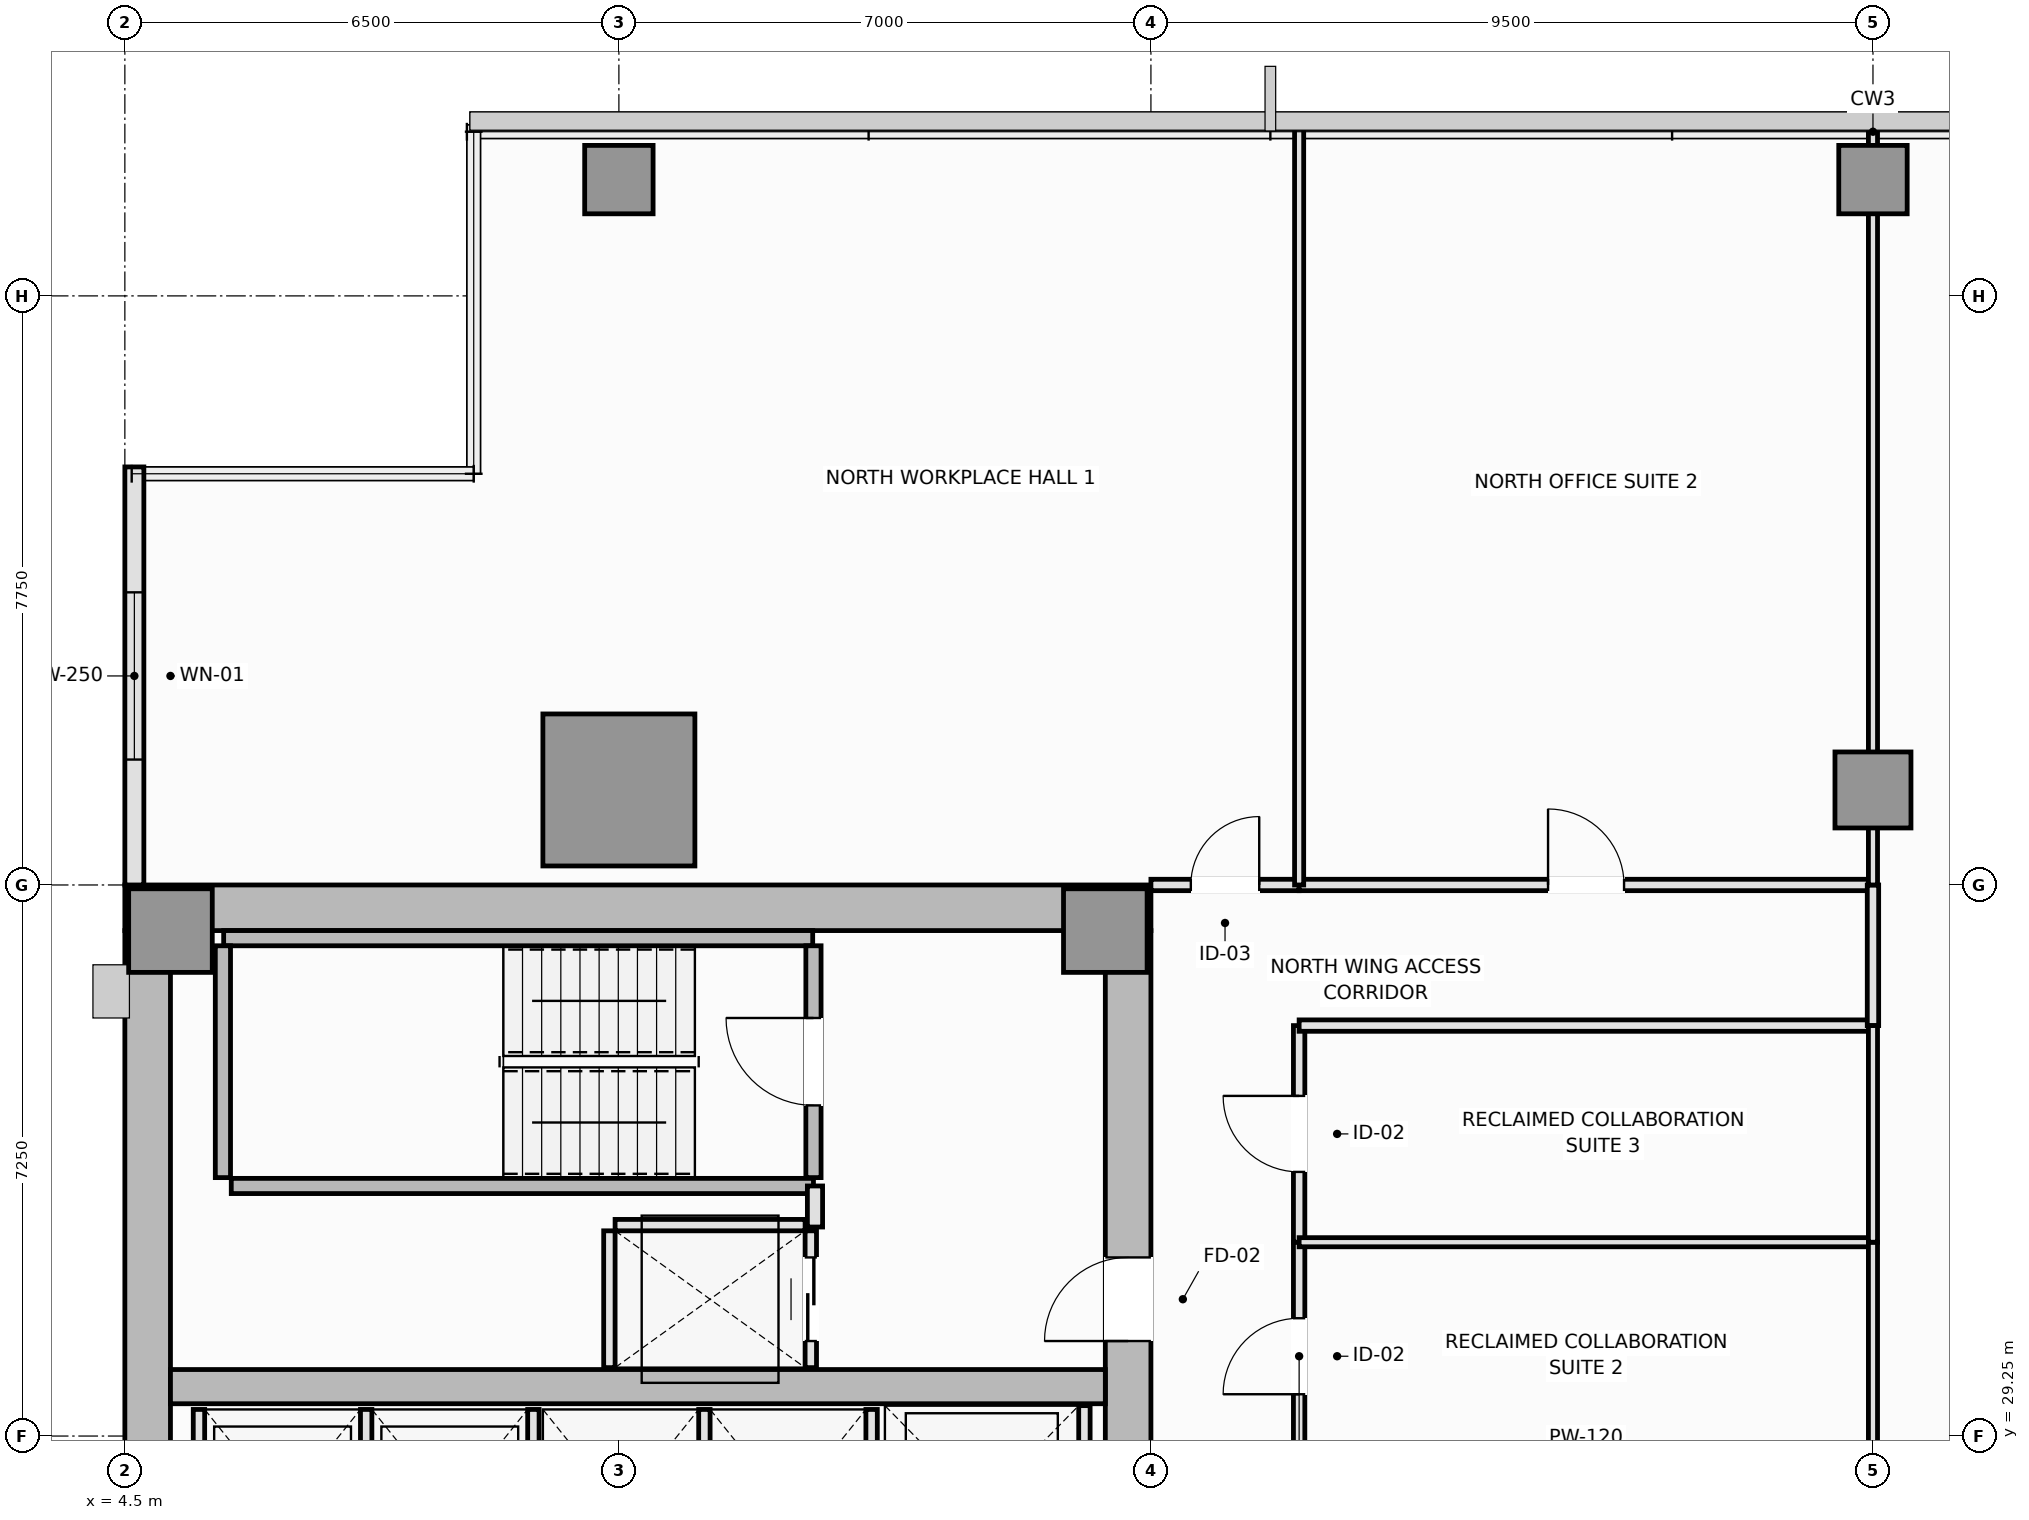
"""IFC4 building model, lengths in metres.
Left out: names, types, materials, properties, quantities, classifications, styles, units other than length and angle.
Written with IfcOpenShell. Run it as: python <this file> out.ifc"""

import sys

from ifc_helpers import new_model, si_unit, direction, frame, frame_2d, origin, origin_2d, place, context, subcontext, project, spatial, rectangle, extrude, element, fill, save


model = new_model("IFC4")
c1 = context("Model", 3, precision=1e-05, world=origin(), true_north=direction((0.0, 1.0)))
c2 = subcontext(c1, "Body", "Model", "MODEL_VIEW")
j1 = project(units=[si_unit("LENGTHUNIT", "METRE"), si_unit("PLANEANGLEUNIT", "RADIAN")], contexts=[c1])
p1 = place(None, origin())
s1 = spatial("IfcSite", under=j1, at=p1, CompositionType="ELEMENT")
p2 = place(p1, origin())
s2 = spatial("IfcBuilding", under=s1, at=p2, CompositionType="ELEMENT")
p3 = place(p2, frame((0.0, 0.0, 169.7)))
s3 = spatial("IfcBuildingStorey", under=s2, at=p3, CompositionType="ELEMENT", Elevation=169.7)
p4 = place(p3, frame((4.5, 36.2, 0.0), z_axis=(0.0, 0.0, 1.0), x_axis=(1.0, 0.0, 0.0)))
e1 = element("IfcWall", 1, at=p4, inside=s3, PredefinedType="SHEAR", context=c2, shape_type="SweptSolid", body=[
    extrude(rectangle(XDim=13.5, YDim=0.6, at=frame_2d((6.75, 0.0))), origin(), (0.0, 0.0, 1.0), 3.55),
])
p5 = place(p3, frame((4.8, 14.6, 0.0), z_axis=(0.0, 0.0, 1.0), x_axis=(0.0, 1.0, 0.0)))
e2 = element("IfcWall", 2, at=p5, inside=s3, PredefinedType="SHEAR", context=c2, shape_type="SweptSolid", body=[
    extrude(rectangle(XDim=21.3, YDim=0.6, at=frame_2d((10.65, 0.0))), origin(), (0.0, 0.0, 1.0), 3.55),
])
p6 = place(p3, frame((17.7, 27.05, 0.0), z_axis=(0.0, 0.0, 1.0), x_axis=(0.0, 1.0, 0.0)))
e3 = element("IfcWall", 3, at=p6, inside=s3, PredefinedType="SHEAR", context=c2, shape_type="SweptSolid", body=[
    extrude(rectangle(XDim=8.85, YDim=0.6, at=frame_2d((4.425, 0.0))), origin(), (0.0, 0.0, 1.0), 3.55),
])
p7 = place(p6, frame((3.45, 0.0, 0.0)))
e4 = element("IfcOpeningElement", 4, at=p7, cuts=e3, PredefinedType="OPENING", context=c2, shape_type="SweptSolid", body=[
    extrude(rectangle(XDim=1.1, YDim=2.15, at=frame_2d((0.55, 1.075))), frame((0.0, 0.31, 0.0), z_axis=(0.0, -1.0, 0.0), x_axis=(1.0, 0.0, 0.0)), (0.0, 0.0, 1.0), 0.62),
])
p8 = place(p3, frame((5.1, 29.9, 0.0), z_axis=(0.0, 0.0, 1.0), x_axis=(1.0, 0.0, 0.0)))
e5 = element("IfcWall", 5, at=p8, inside=s3, PredefinedType="SHEAR", context=c2, shape_type="SweptSolid", body=[
    extrude(rectangle(XDim=12.3, YDim=0.45, at=frame_2d((6.15, 0.0))), origin(), (0.0, 0.0, 1.0), 3.55),
])
for number, where, z_axis, x_axis in (
    (6, (5.1, 35.9, 0.0), (0.0, 0.0, 1.0), (1.0, 0.0, 0.0)),
    (7, (17.4, 35.9, 0.0), (0.0, 0.0, 1.0), (1.0, 0.0, 0.0)),
):
    element("IfcColumn", number, at=place(p3, frame(where, z_axis=z_axis, x_axis=x_axis)), inside=s3, PredefinedType="PILASTER", context=c2, shape_type="SweptSolid", body=[
        extrude(rectangle(XDim=1.1, YDim=1.1, at=origin_2d()), origin(), (0.0, 0.0, 1.0), 3.55),
    ])
p9 = place(p3, frame((11.0, 37.75, 0.0), z_axis=(0.0, 0.0, 1.0), x_axis=(1.0, 0.0, 0.0)))
e8 = element("IfcColumn", 8, at=p9, inside=s3, PredefinedType="COLUMN", context=c2, shape_type="SweptSolid", body=[
    extrude(rectangle(XDim=2.0, YDim=2.0, at=origin_2d()), origin(), (0.0, 0.0, 1.0), 3.55),
])
p10 = place(p3, frame((27.5, 37.75, 0.0), z_axis=(0.0, 0.0, 1.0), x_axis=(1.0, 0.0, 0.0)))
e9 = element("IfcColumn", 9, at=p10, inside=s3, PredefinedType="COLUMN", context=c2, shape_type="SweptSolid", body=[
    extrude(rectangle(XDim=1.0, YDim=1.0, at=origin_2d()), origin(), (0.0, 0.0, 1.0), 3.55),
])
for number, where, z_axis, x_axis in (
    (10, (11.0, 45.78, 0.0), (0.0, 0.0, 1.0), (1.0, 0.0, 0.0)),
    (11, (27.5, 45.78, 0.0), (0.0, 0.0, 1.0), (1.0, 0.0, 0.0)),
):
    element("IfcColumn", number, at=place(p3, frame(where, z_axis=z_axis, x_axis=x_axis)), inside=s3, PredefinedType="COLUMN", context=c2, shape_type="SweptSolid", body=[
        extrude(rectangle(XDim=0.9, YDim=0.9, at=origin_2d()), origin(), (0.0, 0.0, 1.0), 3.55),
    ])
p11 = place(p3, frame((4.625, 42.0, 0.0), z_axis=(0.0, 0.0, 1.0), x_axis=(0.0, -1.0, 0.0)))
e12 = element("IfcWall", 12, at=p11, inside=s3, PredefinedType="SOLIDWALL", context=c2, shape_type="SweptSolid", body=[
    extrude(rectangle(XDim=5.5, YDim=0.25, at=frame_2d((2.75, 0.0))), origin(), (0.0, 0.0, 1.0), 3.35),
])
p12 = place(p11, frame((1.65, 0.0, 0.9)))
e13 = element("IfcOpeningElement", 13, at=p12, cuts=e12, PredefinedType="OPENING", context=c2, shape_type="SweptSolid", body=[
    extrude(rectangle(XDim=2.2, YDim=1.8, at=frame_2d((1.1, 0.9))), frame((0.0, 0.135, 0.0), z_axis=(0.0, -1.0, 0.0), x_axis=(1.0, 0.0, 0.0)), (0.0, 0.0, 1.0), 0.27),
])
p13 = place(p3, frame((5.8, 35.8, 0.0), z_axis=(0.0, 0.0, 1.0), x_axis=(1.0, 0.0, 0.0)))
e14 = element("IfcWall", 14, at=p13, inside=s3, PredefinedType="SOLIDWALL", context=c2, shape_type="SweptSolid", body=[
    extrude(rectangle(XDim=7.75, YDim=0.2, at=frame_2d((3.875, 0.0))), origin(), (0.0, 0.0, 1.0), 3.55),
])
p14 = place(p3, frame((5.79, 32.65, 0.0), z_axis=(0.0, 0.0, 1.0), x_axis=(0.0, 1.0, 0.0)))
e15 = element("IfcWall", 15, at=p14, inside=s3, PredefinedType="SOLIDWALL", context=c2, shape_type="SweptSolid", body=[
    extrude(rectangle(XDim=3.05, YDim=0.2, at=frame_2d((1.525, 0.0))), origin(), (0.0, 0.0, 1.0), 3.55),
])
p15 = place(p3, frame((5.9, 32.54, 0.0), z_axis=(0.0, 0.0, 1.0), x_axis=(1.0, 0.0, 0.0)))
e16 = element("IfcWall", 16, at=p15, inside=s3, PredefinedType="SOLIDWALL", context=c2, shape_type="SweptSolid", body=[
    extrude(rectangle(XDim=7.66, YDim=0.2, at=frame_2d((3.83, 0.0))), origin(), (0.0, 0.0, 1.0), 3.55),
])
p16 = place(p3, frame((13.56, 32.65, 0.0), z_axis=(0.0, 0.0, 1.0), x_axis=(0.0, 1.0, 0.0)))
e17 = element("IfcWall", 17, at=p16, inside=s3, PredefinedType="SOLIDWALL", context=c2, shape_type="SweptSolid", body=[
    extrude(rectangle(XDim=3.05, YDim=0.2, at=frame_2d((1.525, 0.0))), origin(), (0.0, 0.0, 1.0), 3.55),
])
p17 = place(p16, frame((0.95, 0.0, 0.0)))
e18 = element("IfcOpeningElement", 18, at=p17, cuts=e17, PredefinedType="OPENING", context=c2, shape_type="SweptSolid", body=[
    extrude(rectangle(XDim=1.15, YDim=2.15, at=frame_2d((0.575, 1.075))), frame((0.0, 0.11, 0.0), z_axis=(0.0, -1.0, 0.0), x_axis=(1.0, 0.0, 0.0)), (0.0, 0.0, 1.0), 0.22),
])
for number, where, z_axis, x_axis in (
    (19, (5.475, 27.05, 0.0), (0.0, 0.0, 1.0), (0.0, 1.0, 0.0)),
    (20, (7.675, 27.05, 0.0), (0.0, 0.0, 1.0), (0.0, 1.0, 0.0)),
    (21, (9.875, 27.05, 0.0), (0.0, 0.0, 1.0), (0.0, 1.0, 0.0)),
    (22, (12.125, 27.05, 0.0), (0.0, 0.0, 1.0), (0.0, 1.0, 0.0)),
    (23, (14.325, 27.05, 0.0), (0.0, 0.0, 1.0), (0.0, 1.0, 0.0)),
):
    element("IfcWall", number, at=place(p3, frame(where, z_axis=z_axis, x_axis=x_axis)), inside=s3, PredefinedType="PARTITIONING", context=c2, shape_type="SweptSolid", body=[
        extrude(rectangle(XDim=2.55, YDim=0.15, at=frame_2d((1.275, 0.0))), origin(), (0.0, 0.0, 1.0), 3.35),
    ])
p18 = place(p3, frame((17.125, 27.05, 0.0), z_axis=(0.0, 0.0, 1.0), x_axis=(0.0, 1.0, 0.0)))
e24 = element("IfcWall", 24, at=p18, inside=s3, PredefinedType="PARTITIONING", context=c2, shape_type="SweptSolid", body=[
    extrude(rectangle(XDim=2.6, YDim=0.15, at=frame_2d((1.3, 0.0))), origin(), (0.0, 0.0, 1.0), 3.35),
])
p19 = place(p3, frame((10.95, 32.025, 0.0), z_axis=(0.0, 0.0, 1.0), x_axis=(1.0, 0.0, 0.0)))
e25 = element("IfcWall", 25, at=p19, inside=s3, PredefinedType="PARTITIONING", context=c2, shape_type="SweptSolid", body=[
    extrude(rectangle(XDim=2.5, YDim=0.15, at=frame_2d((1.25, 0.0))), origin(), (0.0, 0.0, 1.0), 3.35),
])
p20 = place(p3, frame((10.875, 30.15, 0.0), z_axis=(0.0, 0.0, 1.0), x_axis=(0.0, 1.0, 0.0)))
e26 = element("IfcWall", 26, at=p20, inside=s3, PredefinedType="PARTITIONING", context=c2, shape_type="SweptSolid", body=[
    extrude(rectangle(XDim=1.8, YDim=0.15, at=frame_2d((0.9, 0.0))), origin(), (0.0, 0.0, 1.0), 3.35),
])
p21 = place(p3, frame((13.525, 30.15, 0.0), z_axis=(0.0, 0.0, 1.0), x_axis=(0.0, 1.0, 0.0)))
e27 = element("IfcWall", 27, at=p21, inside=s3, PredefinedType="PARTITIONING", context=c2, shape_type="SweptSolid", body=[
    extrude(rectangle(XDim=1.8, YDim=0.15, at=frame_2d((0.9, 0.0))), origin(), (0.0, 0.0, 1.0), 3.35),
])
p22 = place(p21, frame((0.35, 0.0, 0.0)))
e28 = element("IfcOpeningElement", 28, at=p22, cuts=e27, PredefinedType="OPENING", context=c2, shape_type="SweptSolid", body=[
    extrude(rectangle(XDim=1.1, YDim=2.2, at=frame_2d((0.55, 1.1))), frame((0.0, 0.085, 0.0), z_axis=(0.0, -1.0, 0.0), x_axis=(1.0, 0.0, 0.0)), (0.0, 0.0, 1.0), 0.17),
])
p23 = place(p3, frame((13.58, 32.0, 0.0), z_axis=(0.0, 0.0, 1.0), x_axis=(0.0, 1.0, 0.0)))
e29 = element("IfcWall", 29, at=p23, inside=s3, PredefinedType="PARTITIONING", context=c2, shape_type="SweptSolid", body=[
    extrude(rectangle(XDim=0.54, YDim=0.2, at=frame_2d((0.27, 0.0))), origin(), (0.0, 0.0, 1.0), 3.35),
])
p24 = place(p3, frame((19.95, 28.8, 0.0), z_axis=(0.0, 0.0, 1.0), x_axis=(0.0, 1.0, 0.0)))
e30 = element("IfcWall", 30, at=p24, inside=s3, PredefinedType="PARTITIONING", context=c2, shape_type="SweptSolid", body=[
    extrude(rectangle(XDim=3.0, YDim=0.15, at=frame_2d((1.5, 0.0))), origin(), (0.0, 0.0, 1.0), 3.35),
])
p25 = place(p24, frame((1.0, 0.0, 0.0)))
e31 = element("IfcOpeningElement", 31, at=p25, cuts=e30, PredefinedType="OPENING", context=c2, shape_type="SweptSolid", body=[
    extrude(rectangle(XDim=1.0, YDim=2.15, at=frame_2d((0.5, 1.075))), frame((0.0, 0.085, 0.0), z_axis=(0.0, -1.0, 0.0), x_axis=(1.0, 0.0, 0.0)), (0.0, 0.0, 1.0), 0.17),
])
p26 = place(p3, frame((19.95, 31.8, 0.0), z_axis=(0.0, 0.0, 1.0), x_axis=(0.0, 1.0, 0.0)))
e32 = element("IfcWall", 32, at=p26, inside=s3, PredefinedType="PARTITIONING", context=c2, shape_type="SweptSolid", body=[
    extrude(rectangle(XDim=2.85, YDim=0.15, at=frame_2d((1.425, 0.0))), origin(), (0.0, 0.0, 1.0), 3.35),
])
p27 = place(p26, frame((0.925, 0.0, 0.0)))
e33 = element("IfcOpeningElement", 33, at=p27, cuts=e32, PredefinedType="OPENING", context=c2, shape_type="SweptSolid", body=[
    extrude(rectangle(XDim=1.0, YDim=2.15, at=frame_2d((0.5, 1.075))), frame((0.0, 0.085, 0.0), z_axis=(0.0, -1.0, 0.0), x_axis=(1.0, 0.0, 0.0)), (0.0, 0.0, 1.0), 0.17),
])
p28 = place(p3, frame((18.0, 36.5, 0.0), z_axis=(0.0, 0.0, 1.0), x_axis=(1.0, 0.0, 0.0)))
e34 = element("IfcWall", 34, at=p28, inside=s3, PredefinedType="PARTITIONING", context=c2, shape_type="SweptSolid", body=[
    extrude(rectangle(XDim=1.95, YDim=0.15, at=frame_2d((0.975, 0.0))), origin(), (0.0, 0.0, 1.0), 3.35),
])
p29 = place(p28, frame((0.525, 0.0, 0.0)))
e35 = element("IfcOpeningElement", 35, at=p29, cuts=e34, PredefinedType="OPENING", context=c2, shape_type="SweptSolid", body=[
    extrude(rectangle(XDim=0.9, YDim=2.1, at=frame_2d((0.45, 1.05))), frame((0.0, 0.085, 0.0), z_axis=(0.0, -1.0, 0.0), x_axis=(1.0, 0.0, 0.0)), (0.0, 0.0, 1.0), 0.17),
])
p30 = place(p3, frame((19.95, 34.65, 0.0), z_axis=(0.0, 0.0, 1.0), x_axis=(1.0, 0.0, 0.0)))
e36 = element("IfcWall", 36, at=p30, inside=s3, PredefinedType="PARTITIONING", context=c2, shape_type="SweptSolid", body=[
    extrude(rectangle(XDim=7.55, YDim=0.15, at=frame_2d((3.775, 0.0))), origin(), (0.0, 0.0, 1.0), 3.35),
])
p31 = place(p3, frame((19.95, 36.5, 0.0), z_axis=(0.0, 0.0, 1.0), x_axis=(1.0, 0.0, 0.0)))
e37 = element("IfcWall", 37, at=p31, inside=s3, PredefinedType="PARTITIONING", context=c2, shape_type="SweptSolid", body=[
    extrude(rectangle(XDim=7.55, YDim=0.15, at=frame_2d((3.775, 0.0))), origin(), (0.0, 0.0, 1.0), 3.35),
])
p32 = place(p31, frame((3.275, 0.0, 0.0)))
e38 = element("IfcOpeningElement", 38, at=p32, cuts=e37, PredefinedType="OPENING", context=c2, shape_type="SweptSolid", body=[
    extrude(rectangle(XDim=1.0, YDim=2.15, at=frame_2d((0.5, 1.075))), frame((0.0, 0.085, 0.0), z_axis=(0.0, -1.0, 0.0), x_axis=(1.0, 0.0, 0.0)), (0.0, 0.0, 1.0), 0.17),
])
p33 = place(p3, frame((27.5, 34.65, 0.0), z_axis=(0.0, 0.0, 1.0), x_axis=(0.0, 1.0, 0.0)))
e39 = element("IfcWall", 39, at=p33, inside=s3, PredefinedType="PARTITIONING", context=c2, shape_type="SweptSolid", body=[
    extrude(rectangle(XDim=1.85, YDim=0.15, at=frame_2d((0.925, 0.0))), origin(), (0.0, 0.0, 1.0), 3.35),
])
p34 = place(p3, frame((19.95, 31.8, 0.0), z_axis=(0.0, 0.0, 1.0), x_axis=(1.0, 0.0, 0.0)))
e40 = element("IfcWall", 40, at=p34, inside=s3, PredefinedType="PARTITIONING", context=c2, shape_type="SweptSolid", body=[
    extrude(rectangle(XDim=7.55, YDim=0.12, at=frame_2d((3.775, 0.0))), origin(), (0.0, 0.0, 1.0), 3.35),
])
p35 = place(p3, frame((27.5, 28.8, 0.0), z_axis=(0.0, 0.0, 1.0), x_axis=(0.0, 1.0, 0.0)))
e41 = element("IfcWall", 41, at=p35, inside=s3, PredefinedType="PARTITIONING", context=c2, shape_type="SweptSolid", body=[
    extrude(rectangle(XDim=3.0, YDim=0.12, at=frame_2d((1.5, 0.0))), origin(), (0.0, 0.0, 1.0), 3.35),
])
p36 = place(p3, frame((27.5, 31.8, 0.0), z_axis=(0.0, 0.0, 1.0), x_axis=(0.0, 1.0, 0.0)))
e42 = element("IfcWall", 42, at=p36, inside=s3, PredefinedType="PARTITIONING", context=c2, shape_type="SweptSolid", body=[
    extrude(rectangle(XDim=2.85, YDim=0.12, at=frame_2d((1.425, 0.0))), origin(), (0.0, 0.0, 1.0), 3.35),
])
p37 = place(p3, frame((19.95, 36.5, 0.0), z_axis=(0.0, 0.0, 1.0), x_axis=(0.0, 1.0, 0.0)))
e43 = element("IfcWall", 43, at=p37, inside=s3, PredefinedType="PARTITIONING", context=c2, shape_type="SweptSolid", body=[
    extrude(rectangle(XDim=9.99, YDim=0.12, at=frame_2d((4.995, 0.0))), origin(), (0.0, 0.0, 1.0), 3.35),
])
p38 = place(p3, frame((27.5, 36.5, 0.0), z_axis=(0.0, 0.0, 1.0), x_axis=(0.0, 1.0, 0.0)))
e44 = element("IfcWall", 44, at=p38, inside=s3, PredefinedType="PARTITIONING", context=c2, shape_type="SweptSolid", body=[
    extrude(rectangle(XDim=9.99, YDim=0.12, at=frame_2d((4.995, 0.0))), origin(), (0.0, 0.0, 1.0), 2.85),
])
p39 = place(p12, origin())
e45 = element("IfcWindow", 45, at=p39, inside=s3, PartitioningType="SINGLE_PANEL", PredefinedType="WINDOW", context=c2, shape_type="SweptSolid", body=[
    extrude(rectangle(XDim=2.2, YDim=1.8, at=frame_2d((1.1, 0.9))), frame((0.0, 0.03, 0.0), z_axis=(0.0, -1.0, 0.0), x_axis=(1.0, 0.0, 0.0)), (0.0, 0.0, 1.0), 0.06),
])
fill(e13, e45)
p40 = place(p17, origin())
e46 = element("IfcDoor", 46, at=p40, inside=s3, OperationType="SINGLE_SWING_RIGHT", PredefinedType="DOOR", context=c2, shape_type="SweptSolid", body=[
    extrude(rectangle(XDim=1.15, YDim=2.15, at=frame_2d((0.575, 1.075))), frame((0.0, 0.025, 0.0), z_axis=(0.0, -1.0, 0.0), x_axis=(1.0, 0.0, 0.0)), (0.0, 0.0, 1.0), 0.05),
])
fill(e18, e46)
p41 = place(p22, origin())
e47 = element("IfcDoor", 47, at=p41, inside=s3, OperationType="DOUBLE_DOOR_SLIDING", PredefinedType="DOOR", context=c2, shape_type="SweptSolid", body=[
    extrude(rectangle(XDim=1.1, YDim=2.2, at=frame_2d((0.55, 1.1))), frame((0.0, 0.025, 0.0), z_axis=(0.0, -1.0, 0.0), x_axis=(1.0, 0.0, 0.0)), (0.0, 0.0, 1.0), 0.05),
])
fill(e28, e47)
p42 = place(p7, origin())
e48 = element("IfcDoor", 48, at=p42, inside=s3, OperationType="SINGLE_SWING_LEFT", PredefinedType="DOOR", context=c2, shape_type="SweptSolid", body=[
    extrude(rectangle(XDim=1.1, YDim=2.15, at=frame_2d((0.55, 1.075))), frame((0.0, 0.025, 0.0), z_axis=(0.0, -1.0, 0.0), x_axis=(1.0, 0.0, 0.0)), (0.0, 0.0, 1.0), 0.05),
])
fill(e4, e48)
p43 = place(p25, origin())
e49 = element("IfcDoor", 49, at=p43, inside=s3, OperationType="SINGLE_SWING_LEFT", PredefinedType="DOOR", context=c2, shape_type="SweptSolid", body=[
    extrude(rectangle(XDim=1.0, YDim=2.15, at=frame_2d((0.5, 1.075))), frame((0.0, 0.025, 0.0), z_axis=(0.0, -1.0, 0.0), x_axis=(1.0, 0.0, 0.0)), (0.0, 0.0, 1.0), 0.05),
])
fill(e31, e49)
p44 = place(p27, origin())
e50 = element("IfcDoor", 50, at=p44, inside=s3, OperationType="SINGLE_SWING_RIGHT", PredefinedType="DOOR", context=c2, shape_type="SweptSolid", body=[
    extrude(rectangle(XDim=1.0, YDim=2.15, at=frame_2d((0.5, 1.075))), frame((0.0, 0.025, 0.0), z_axis=(0.0, -1.0, 0.0), x_axis=(1.0, 0.0, 0.0)), (0.0, 0.0, 1.0), 0.05),
])
fill(e33, e50)
p45 = place(p29, origin())
e51 = element("IfcDoor", 51, at=p45, inside=s3, OperationType="SINGLE_SWING_RIGHT", PredefinedType="DOOR", context=c2, shape_type="SweptSolid", body=[
    extrude(rectangle(XDim=0.9, YDim=2.1, at=frame_2d((0.45, 1.05))), frame((0.0, 0.025, 0.0), z_axis=(0.0, -1.0, 0.0), x_axis=(1.0, 0.0, 0.0)), (0.0, 0.0, 1.0), 0.05),
])
fill(e35, e51)
p46 = place(p32, origin())
e52 = element("IfcDoor", 52, at=p46, inside=s3, OperationType="SINGLE_SWING_LEFT", PredefinedType="DOOR", context=c2, shape_type="SweptSolid", body=[
    extrude(rectangle(XDim=1.0, YDim=2.15, at=frame_2d((0.5, 1.075))), frame((0.0, 0.025, 0.0), z_axis=(0.0, -1.0, 0.0), x_axis=(1.0, 0.0, 0.0)), (0.0, 0.0, 1.0), 0.05),
])
fill(e38, e52)
save(model, sys.argv[1])
